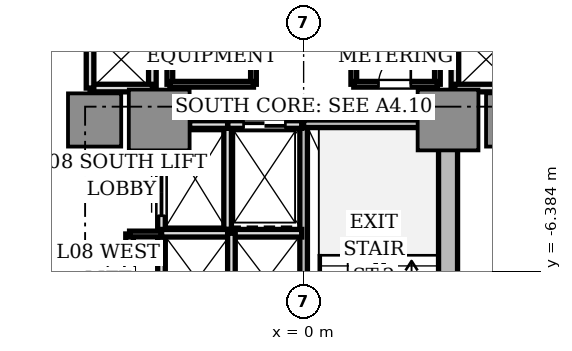
"""IFC4 building model, lengths in metres.
Left out: names, types, materials, properties, quantities, classifications, styles, units other than length and angle.
Written with IfcOpenShell. Run it as: python <this file> out.ifc"""

import sys

from ifc_helpers import new_model, si_unit, direction, frame, frame_2d, origin, origin_2d, place, context, subcontext, project, spatial, rectangle, extrude, source, transform, mapped, element, fill, save


model = new_model("IFC4")
c1 = context("Model", 3, precision=1e-05, world=origin(), true_north=direction((0.0, 1.0)))
c2 = subcontext(c1, "Body", "Model", "MODEL_VIEW")
j1 = project(units=[si_unit("LENGTHUNIT", "METRE"), si_unit("PLANEANGLEUNIT", "RADIAN")], contexts=[c1])
p1 = place(None, origin())
s1 = spatial("IfcSite", under=j1, at=p1, CompositionType="ELEMENT")
p2 = place(p1, origin())
s2 = spatial("IfcBuilding", under=s1, at=p2, CompositionType="ELEMENT")
p3 = place(p2, frame((0.0, 0.0, 33.15)))
s3 = spatial("IfcBuildingStorey", under=s2, at=p3, CompositionType="ELEMENT", Elevation=33.15)
p4 = place(p3, frame((3.8, -9.75, 0.0), z_axis=(0.0, 0.0, 1.0), x_axis=(0.0, 1.0, 0.0)))
e1 = element("IfcWall", 1, at=p4, inside=s3, PredefinedType="SHEAR", context=c2, shape_type="SweptSolid", body=[
    extrude(rectangle(XDim=6.9, YDim=0.5, at=frame_2d((3.45, 0.0))), origin(), (0.0, 0.0, 1.0), 3.11),
])
m1 = source(origin(), c2, "Body", "SweptSolid", [
    extrude(rectangle(XDim=1.6, YDim=1.6, at=origin_2d()), origin(), (0.0, 0.0, 1.0), 3.11),
])
for number, where, z_axis, x_axis in (
    (2, (-3.8, -2.4, 0.0), (0.0, 0.0, 1.0), (1.0, 0.0, 0.0)),
    (3, (3.8, -2.4, 0.0), (0.0, 0.0, 1.0), (1.0, 0.0, 0.0)),
):
    element("IfcColumn", number, at=place(p3, frame(where, z_axis=z_axis, x_axis=x_axis)), inside=s3, PredefinedType="COLUMN", context=c2, shape_type="MappedRepresentation", body=[
        mapped(m1, transform((0.0, 0.0, 0.0), scale=1.0)),
    ])
m2 = source(origin(), c2, "Body", "SweptSolid", [
    extrude(rectangle(XDim=1.4, YDim=1.4, at=origin_2d()), origin(), (0.0, 0.0, 1.0), 3.11),
])
for number, where, z_axis, x_axis in (
    (4, (5.5, -2.4, 0.0), (0.0, 0.0, 1.0), (1.0, 0.0, 0.0)),
    (5, (-5.5, -2.4, 0.0), (0.0, 0.0, 1.0), (1.0, 0.0, 0.0)),
):
    element("IfcColumn", number, at=place(p3, frame(where, z_axis=z_axis, x_axis=x_axis)), inside=s3, PredefinedType="COLUMN", context=c2, shape_type="MappedRepresentation", body=[
        mapped(m2, transform((0.0, 0.0, 0.0), scale=1.0)),
    ])
p5 = place(p3, frame((0.0, -10.18, 0.0), z_axis=(0.0, 0.0, 1.0), x_axis=(0.0, 1.0, 0.0)))
e6 = element("IfcWall", 6, at=p5, inside=s3, PredefinedType="SOLIDWALL", context=c2, shape_type="SweptSolid", body=[
    extrude(rectangle(XDim=7.68, YDim=0.2, at=frame_2d((3.84, 0.0))), origin(), (0.0, 0.0, 1.0), 3.11),
])
p6 = place(p5, frame((0.28, 0.0, 0.0)))
e7 = element("IfcOpeningElement", 7, at=p6, cuts=e6, PredefinedType="OPENING", context=c2, shape_type="SweptSolid", body=[
    extrude(rectangle(XDim=1.1, YDim=2.15, at=frame_2d((0.55, 1.075))), frame((0.0, 0.11, 0.0), z_axis=(0.0, -1.0, 0.0), x_axis=(1.0, 0.0, 0.0)), (0.0, 0.0, 1.0), 0.22),
])
p7 = place(p3, frame((0.0, -2.5, 0.0), z_axis=(0.0, 0.0, 1.0), x_axis=(1.0, 0.0, 0.0)))
e8 = element("IfcWall", 8, at=p7, inside=s3, PredefinedType="SOLIDWALL", context=c2, shape_type="SweptSolid", body=[
    extrude(rectangle(XDim=3.72, YDim=0.2, at=frame_2d((1.86, 0.0))), origin(), (0.0, 0.0, 1.0), 3.11),
])
p8 = place(p3, frame((-2.0, -5.28, 0.0), z_axis=(0.0, 0.0, 1.0), x_axis=(0.0, 1.0, 0.0)))
e9 = element("IfcWall", 9, at=p8, inside=s3, PredefinedType="SOLIDWALL", context=c2, shape_type="SweptSolid", body=[
    extrude(rectangle(XDim=2.78, YDim=0.2, at=frame_2d((1.39, 0.0))), origin(), (0.0, 0.0, 1.0), 2.66),
])
p9 = place(p3, frame((-2.0, -2.52, 0.0), z_axis=(0.0, 0.0, 1.0), x_axis=(1.0, 0.0, 0.0)))
e10 = element("IfcWall", 10, at=p9, inside=s3, PredefinedType="SOLIDWALL", context=c2, shape_type="SweptSolid", body=[
    extrude(rectangle(XDim=1.95, YDim=0.2, at=frame_2d((0.975, 0.0))), origin(), (0.0, 0.0, 1.0), 2.66),
])
p10 = place(p9, frame((0.42, 0.0, 0.0)))
e11 = element("IfcOpeningElement", 11, at=p10, cuts=e10, PredefinedType="OPENING", context=c2, shape_type="SweptSolid", body=[
    extrude(rectangle(XDim=1.1, YDim=2.2, at=frame_2d((0.55, 1.1))), frame((0.0, 0.11, 0.0), z_axis=(0.0, -1.0, 0.0), x_axis=(1.0, 0.0, 0.0)), (0.0, 0.0, 1.0), 0.22),
])
p11 = place(p3, frame((-3.0, -2.52, 0.0), z_axis=(0.0, 0.0, 1.0), x_axis=(1.0, 0.0, 0.0)))
e12 = element("IfcWall", 12, at=p11, inside=s3, PredefinedType="SOLIDWALL", context=c2, shape_type="SweptSolid", body=[
    extrude(rectangle(XDim=1.0, YDim=0.2, at=frame_2d((0.5, 0.0))), origin(), (0.0, 0.0, 1.0), 2.66),
])
p12 = place(p3, frame((-3.74, -5.36, 0.0), z_axis=(0.0, 0.0, 1.0), x_axis=(0.0, 1.0, 0.0)))
e13 = element("IfcWall", 13, at=p12, inside=s3, PredefinedType="SOLIDWALL", context=c2, shape_type="SweptSolid", body=[
    extrude(rectangle(XDim=2.08, YDim=0.2, at=frame_2d((1.04, 0.0))), origin(), (0.0, 0.0, 1.0), 2.66),
])
p13 = place(p12, frame((0.44, 0.0, 0.0)))
e14 = element("IfcOpeningElement", 14, at=p13, cuts=e13, PredefinedType="OPENING", context=c2, shape_type="SweptSolid", body=[
    extrude(rectangle(XDim=1.2, YDim=2.2, at=frame_2d((0.6, 1.1))), frame((0.0, 0.11, 0.0), z_axis=(0.0, -1.0, 0.0), x_axis=(1.0, 0.0, 0.0)), (0.0, 0.0, 1.0), 0.22),
])
p14 = place(p3, frame((-3.74, -7.86, 0.0), z_axis=(0.0, 0.0, 1.0), x_axis=(0.0, 1.0, 0.0)))
e15 = element("IfcWall", 15, at=p14, inside=s3, PredefinedType="SOLIDWALL", context=c2, shape_type="SweptSolid", body=[
    extrude(rectangle(XDim=2.48, YDim=0.2, at=frame_2d((1.24, 0.0))), origin(), (0.0, 0.0, 1.0), 2.66),
])
p15 = place(p3, frame((-3.74, -5.38, 0.0), z_axis=(0.0, 0.0, 1.0), x_axis=(1.0, 0.0, 0.0)))
e16 = element("IfcWall", 16, at=p15, inside=s3, PredefinedType="SOLIDWALL", context=c2, shape_type="SweptSolid", body=[
    extrude(rectangle(XDim=3.69, YDim=0.2, at=frame_2d((1.845, 0.0))), origin(), (0.0, 0.0, 1.0), 2.66),
])
p16 = place(p3, frame((-1.9, -7.86, 0.0), z_axis=(0.0, 0.0, 1.0), x_axis=(0.0, 1.0, 0.0)))
e17 = element("IfcWall", 17, at=p16, inside=s3, PredefinedType="SOLIDWALL", context=c2, shape_type="SweptSolid", body=[
    extrude(rectangle(XDim=2.48, YDim=0.2, at=frame_2d((1.24, 0.0))), origin(), (0.0, 0.0, 1.0), 2.66),
])
p17 = place(p3, frame((3.98, -1.56, 0.0), z_axis=(0.0, 0.0, 1.0), x_axis=(0.0, 1.0, 0.0)))
e18 = element("IfcWall", 18, at=p17, inside=s3, PredefinedType="SOLIDWALL", context=c2, shape_type="SweptSolid", body=[
    extrude(rectangle(XDim=3.12, YDim=0.2, at=frame_2d((1.56, 0.0))), origin(), (0.0, 0.0, 1.0), 2.18),
])
p18 = place(p3, frame((3.98, -1.56, 0.0), z_axis=(0.0, 0.0, 1.0), x_axis=(1.0, 0.0, 0.0)))
e19 = element("IfcWall", 19, at=p18, inside=s3, PredefinedType="SOLIDWALL", context=c2, shape_type="SweptSolid", body=[
    extrude(rectangle(XDim=1.64, YDim=0.2, at=frame_2d((0.82, 0.0))), origin(), (0.0, 0.0, 1.0), 2.66),
])
p19 = place(p3, frame((-3.98, -1.56, 0.0), z_axis=(0.0, 0.0, 1.0), x_axis=(0.0, 1.0, 0.0)))
e20 = element("IfcWall", 20, at=p19, inside=s3, PredefinedType="SOLIDWALL", context=c2, shape_type="SweptSolid", body=[
    extrude(rectangle(XDim=3.12, YDim=0.2, at=frame_2d((1.56, 0.0))), origin(), (0.0, 0.0, 1.0), 2.18),
])
p20 = place(p3, frame((-5.62, -1.56, 0.0), z_axis=(0.0, 0.0, 1.0), x_axis=(1.0, 0.0, 0.0)))
e21 = element("IfcWall", 21, at=p20, inside=s3, PredefinedType="SOLIDWALL", context=c2, shape_type="SweptSolid", body=[
    extrude(rectangle(XDim=1.64, YDim=0.2, at=frame_2d((0.82, 0.0))), origin(), (0.0, 0.0, 1.0), 2.66),
])
p21 = place(p3, frame((-5.62, -1.56, 0.0), z_axis=(0.0, 0.0, 1.0), x_axis=(0.0, 1.0, 0.0)))
e22 = element("IfcWall", 22, at=p21, inside=s3, PredefinedType="SOLIDWALL", context=c2, shape_type="SweptSolid", body=[
    extrude(rectangle(XDim=1.56, YDim=0.2, at=frame_2d((0.78, 0.0))), origin(), (0.0, 0.0, 1.0), 2.66),
])
p22 = place(p3, frame((-4.58, -7.86, 0.0), z_axis=(0.0, 0.0, 1.0), x_axis=(0.0, 1.0, 0.0)))
e23 = element("IfcWall", 23, at=p22, inside=s3, PredefinedType="SOLIDWALL", context=c2, shape_type="SweptSolid", body=[
    extrude(rectangle(XDim=2.46, YDim=0.2, at=frame_2d((1.23, 0.0))), origin(), (0.0, 0.0, 1.0), 2.66),
])
p23 = place(p22, frame((0.2, 0.0, 0.0)))
e24 = element("IfcOpeningElement", 24, at=p23, cuts=e23, PredefinedType="OPENING", context=c2, shape_type="SweptSolid", body=[
    extrude(rectangle(XDim=0.85, YDim=2.1, at=frame_2d((0.425, 1.05))), frame((0.0, 0.11, 0.0), z_axis=(0.0, -1.0, 0.0), x_axis=(1.0, 0.0, 0.0)), (0.0, 0.0, 1.0), 0.22),
])
p24 = place(p22, frame((1.38, 0.0, 0.0)))
e25 = element("IfcOpeningElement", 25, at=p24, cuts=e23, PredefinedType="OPENING", context=c2, shape_type="SweptSolid", body=[
    extrude(rectangle(XDim=0.85, YDim=2.1, at=frame_2d((0.425, 1.05))), frame((0.0, 0.11, 0.0), z_axis=(0.0, -1.0, 0.0), x_axis=(1.0, 0.0, 0.0)), (0.0, 0.0, 1.0), 0.22),
])
p25 = place(p3, frame((-4.58, -5.4, 0.0), z_axis=(0.0, 0.0, 1.0), x_axis=(1.0, 0.0, 0.0)))
e26 = element("IfcWall", 26, at=p25, inside=s3, PredefinedType="PARTITIONING", context=c2, shape_type="SweptSolid", body=[
    extrude(rectangle(XDim=0.84, YDim=0.15, at=frame_2d((0.42, 0.0))), origin(), (0.0, 0.0, 1.0), 2.66),
])
p26 = place(p3, frame((-1.32, -1.46, 0.0), z_axis=(0.0, 0.0, 1.0), x_axis=(0.0, 1.0, 0.0)))
e27 = element("IfcWall", 27, at=p26, inside=s3, PredefinedType="PARTITIONING", context=c2, shape_type="SweptSolid", body=[
    extrude(rectangle(XDim=2.92, YDim=0.15, at=frame_2d((1.46, 0.0))), origin(), (0.0, 0.0, 1.0), 2.66),
])
p27 = place(p3, frame((-3.52, -1.46, 0.0), z_axis=(0.0, 0.0, 1.0), x_axis=(0.0, 1.0, 0.0)))
e28 = element("IfcWall", 28, at=p27, inside=s3, PredefinedType="PARTITIONING", context=c2, shape_type="SweptSolid", body=[
    extrude(rectangle(XDim=2.92, YDim=0.15, at=frame_2d((1.46, 0.0))), origin(), (0.0, 0.0, 1.0), 2.18),
])
p28 = place(p3, frame((-3.52, -1.46, 0.0), z_axis=(0.0, 0.0, 1.0), x_axis=(1.0, 0.0, 0.0)))
e29 = element("IfcWall", 29, at=p28, inside=s3, PredefinedType="PARTITIONING", context=c2, shape_type="SweptSolid", body=[
    extrude(rectangle(XDim=2.2, YDim=0.15, at=frame_2d((1.1, 0.0))), origin(), (0.0, 0.0, 1.0), 2.66),
])
p29 = place(p3, frame((1.32, -1.46, 0.0), z_axis=(0.0, 0.0, 1.0), x_axis=(0.0, 1.0, 0.0)))
e30 = element("IfcWall", 30, at=p29, inside=s3, PredefinedType="PARTITIONING", context=c2, shape_type="SweptSolid", body=[
    extrude(rectangle(XDim=2.92, YDim=0.15, at=frame_2d((1.46, 0.0))), origin(), (0.0, 0.0, 1.0), 2.66),
])
p30 = place(p3, frame((3.52, -1.46, 0.0), z_axis=(0.0, 0.0, 1.0), x_axis=(0.0, 1.0, 0.0)))
e31 = element("IfcWall", 31, at=p30, inside=s3, PredefinedType="PARTITIONING", context=c2, shape_type="SweptSolid", body=[
    extrude(rectangle(XDim=2.92, YDim=0.15, at=frame_2d((1.46, 0.0))), origin(), (0.0, 0.0, 1.0), 2.18),
])
p31 = place(p3, frame((1.32, -1.46, 0.0), z_axis=(0.0, 0.0, 1.0), x_axis=(1.0, 0.0, 0.0)))
e32 = element("IfcWall", 32, at=p31, inside=s3, PredefinedType="PARTITIONING", context=c2, shape_type="SweptSolid", body=[
    extrude(rectangle(XDim=2.2, YDim=0.15, at=frame_2d((1.1, 0.0))), origin(), (0.0, 0.0, 1.0), 2.66),
])
p32 = place(p31, frame((0.65, 0.0, 0.0)))
e33 = element("IfcOpeningElement", 33, at=p32, cuts=e32, PredefinedType="OPENING", context=c2, shape_type="SweptSolid", body=[
    extrude(rectangle(XDim=0.85, YDim=2.1, at=frame_2d((0.425, 1.05))), frame((0.0, 0.085, 0.0), z_axis=(0.0, -1.0, 0.0), x_axis=(1.0, 0.0, 0.0)), (0.0, 0.0, 1.0), 0.17),
])
m3 = source(origin(), c2, "Body", "SweptSolid", [
    extrude(rectangle(XDim=1.1, YDim=0.05, at=origin_2d()), origin(), (0.0, 0.0, 1.0), 2.2),
])
p33 = place(p10, frame((0.55, 0.0, 0.0)))
e34 = element("IfcDoor", 34, at=p33, inside=s3, OperationType="DOUBLE_DOOR_SLIDING", PredefinedType="DOOR", context=c2, shape_type="MappedRepresentation", body=[
    mapped(m3, transform((0.0, 0.0, 0.0), scale=1.0)),
])
fill(e11, e34)
m4 = source(origin(), c2, "Body", "SweptSolid", [
    extrude(rectangle(XDim=1.2, YDim=0.05, at=origin_2d()), origin(), (0.0, 0.0, 1.0), 2.2),
])
p34 = place(p13, frame((0.6, 0.0, 0.0)))
e35 = element("IfcDoor", 35, at=p34, inside=s3, OperationType="DOUBLE_DOOR_SLIDING", PredefinedType="DOOR", context=c2, shape_type="MappedRepresentation", body=[
    mapped(m4, transform((0.0, 0.0, 0.0), scale=1.0)),
])
fill(e14, e35)
m5 = source(origin(), c2, "Body", "SweptSolid", [
    extrude(rectangle(XDim=0.85, YDim=0.05, at=origin_2d()), origin(), (0.0, 0.0, 1.0), 2.1),
])
p35 = place(p24, frame((0.425, 0.0, 0.0)))
e36 = element("IfcDoor", 36, at=p35, inside=s3, OperationType="SINGLE_SWING_RIGHT", PredefinedType="DOOR", context=c2, shape_type="MappedRepresentation", body=[
    mapped(m5, transform((0.0, 0.0, 0.0), scale=1.0)),
])
fill(e25, e36)
p36 = place(p32, frame((0.425, 0.0, 0.0)))
e37 = element("IfcDoor", 37, at=p36, inside=s3, OperationType="SINGLE_SWING_RIGHT", PredefinedType="DOOR", context=c2, shape_type="MappedRepresentation", body=[
    mapped(m5, transform((0.0, 0.0, 0.0), scale=1.0)),
])
fill(e33, e37)
save(model, sys.argv[1])
